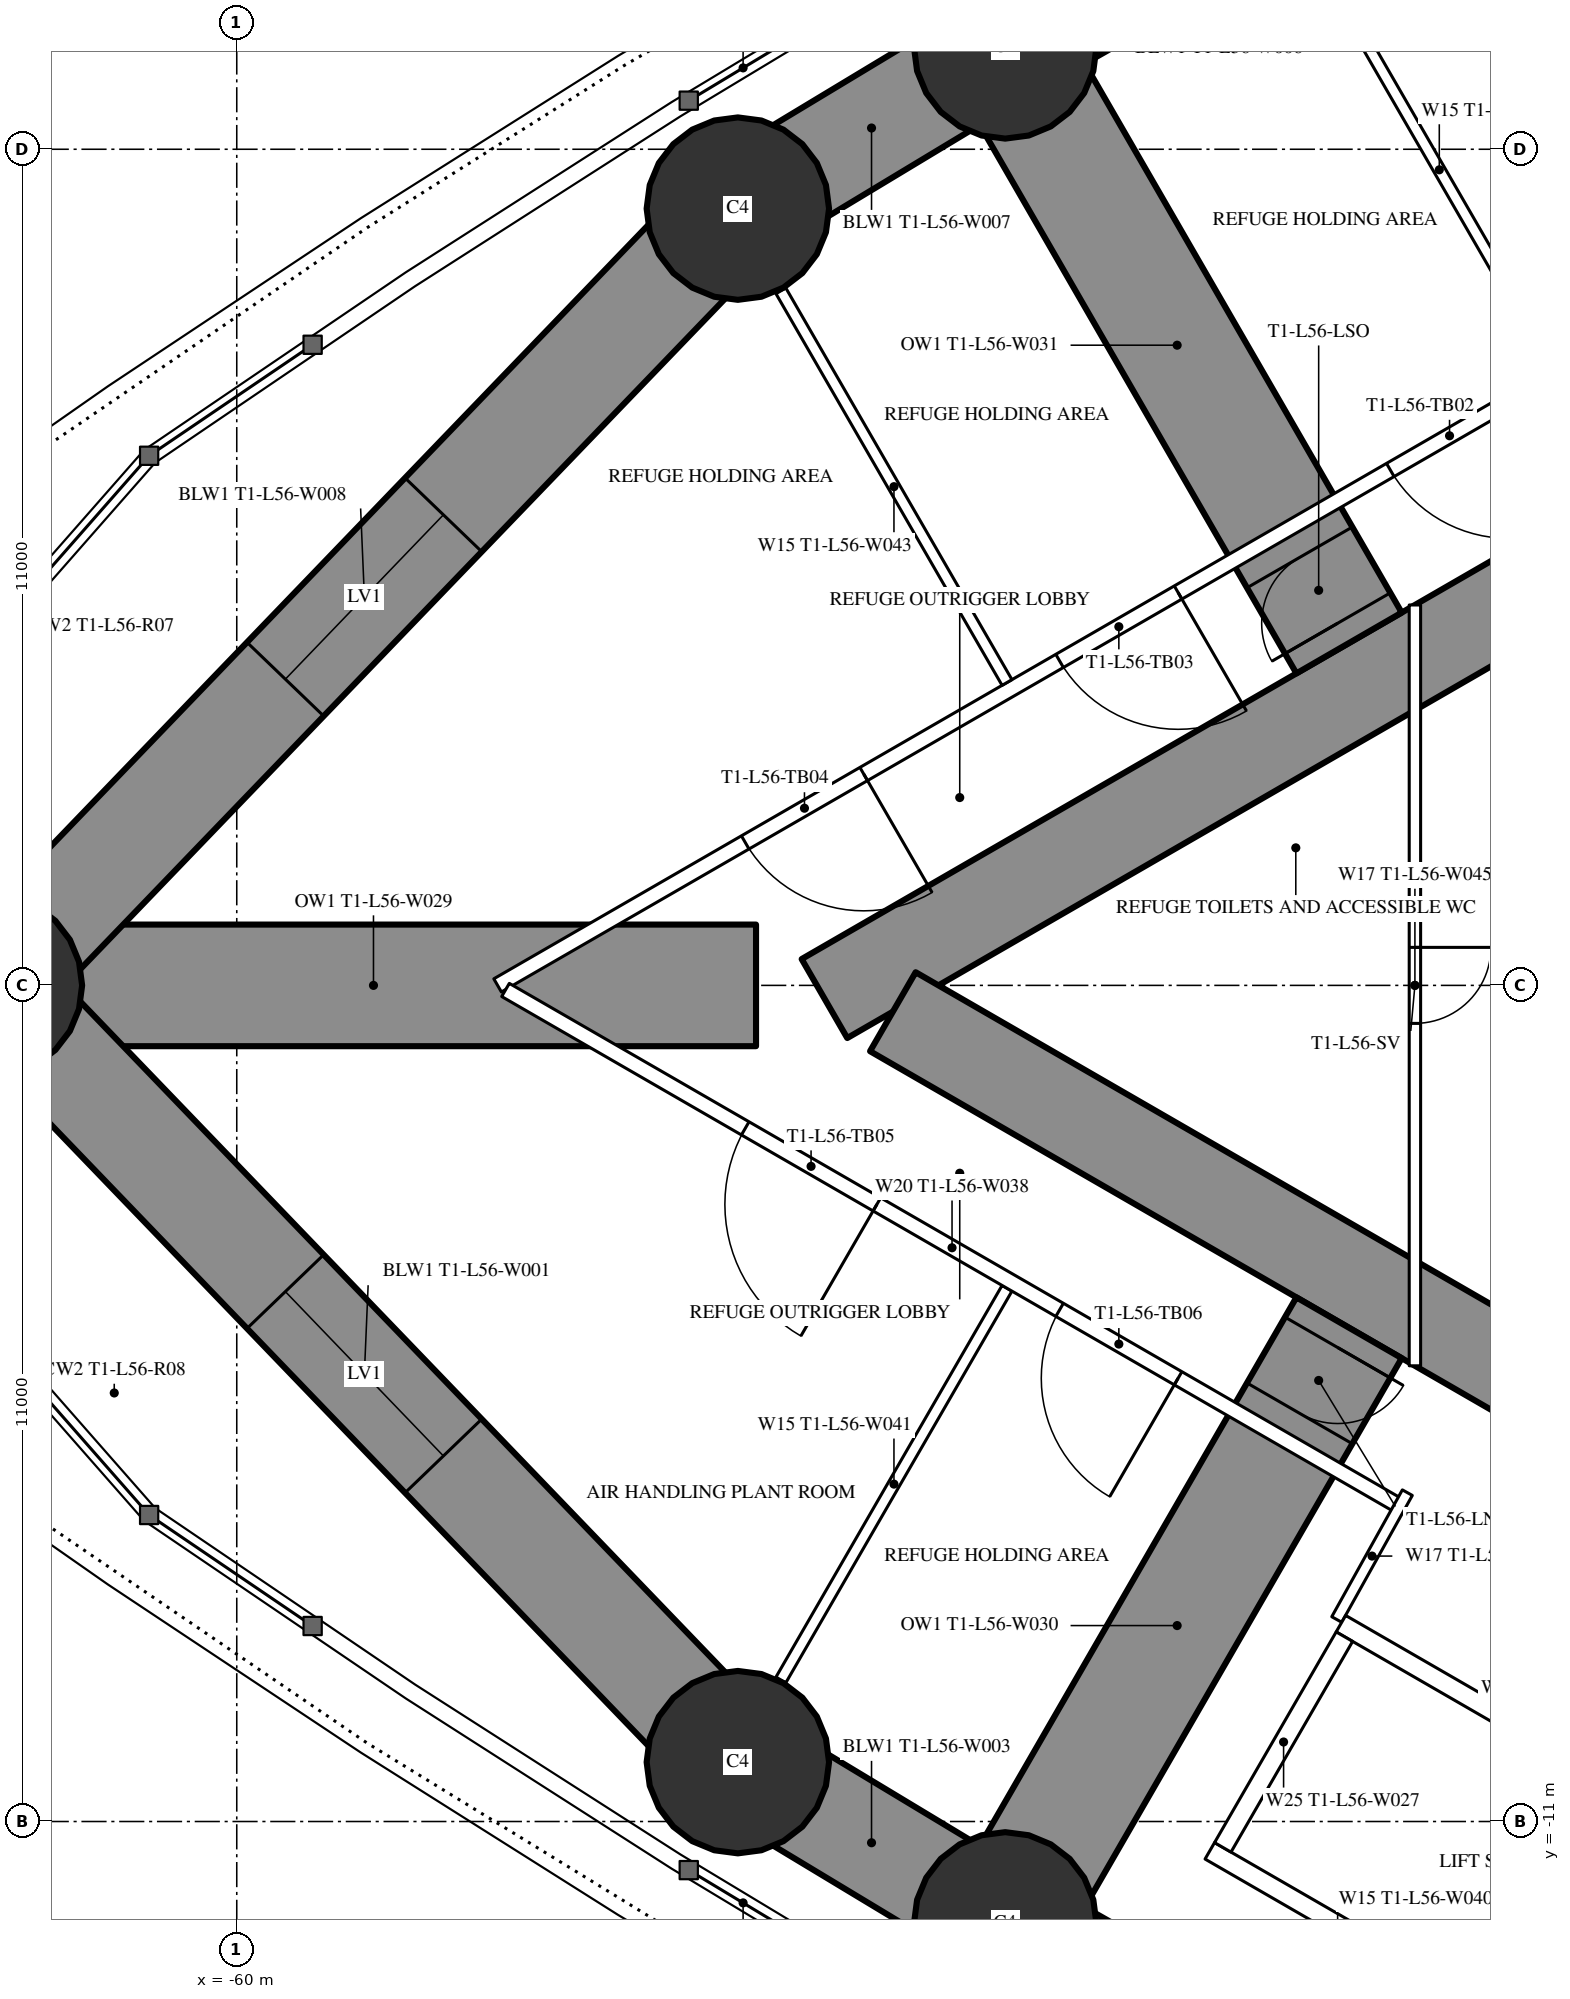
"""IFC4 building model, lengths in metres.
Left out: names, types, materials, properties, quantities, classifications, styles, units other than length and angle.
Written with IfcOpenShell. Run it as: python <this file> out.ifc"""

import sys

from ifc_helpers import new_model, si_unit, direction, frame, frame_2d, origin, origin_2d, place, context, subcontext, project, spatial, rectangle, circle, extrude, element, fill, save


model = new_model("IFC4")
c1 = context("Model", 3, precision=1e-05, world=origin(), true_north=direction((0.0, 1.0)))
c2 = subcontext(c1, "Body", "Model", "MODEL_VIEW")
j1 = project(units=[si_unit("LENGTHUNIT", "METRE"), si_unit("PLANEANGLEUNIT", "RADIAN")], contexts=[c1])
p1 = place(None, origin())
s1 = spatial("IfcSite", under=j1, at=p1, CompositionType="ELEMENT")
p2 = place(p1, origin())
s2 = spatial("IfcBuilding", under=s1, at=p2, CompositionType="ELEMENT")
p3 = place(p2, frame((0.0, 0.0, 210.3)))
s3 = spatial("IfcBuildingStorey", under=s2, at=p3, CompositionType="ELEMENT", Elevation=210.3)
for number, where, z_axis, x_axis in (
    (1, (-63.234, 0.0, 0.0), (0.0, 0.0, 1.0), (1.0, 0.0, 0.0)),
    (2, (-53.408, -10.219, 0.0), (0.0, 0.0, 1.0), (1.0, 0.0, 0.0)),
    (3, (-49.89, -12.34, 0.0), (0.0, 0.0, 1.0), (1.0, 0.0, 0.0)),
    (4, (-49.89, 12.34, 0.0), (0.0, 0.0, 1.0), (1.0, 0.0, 0.0)),
    (5, (-53.408, 10.219, 0.0), (0.0, 0.0, 1.0), (1.0, 0.0, 0.0)),
):
    element("IfcColumn", number, at=place(p3, frame(where, z_axis=z_axis, x_axis=x_axis)), inside=s3, PredefinedType="COLUMN", context=c2, shape_type="SweptSolid", body=[
        extrude(circle(Radius=1.2, at=origin_2d()), origin(), (0.0, 0.0, 1.0), 5.0),
    ])
p4 = place(p3, frame((-27.2, 14.3, 0.0), z_axis=(0.0, 0.0, 1.0), x_axis=(-0.866026593062, -0.499997940104, 0.0)))
e6 = element("IfcWall", 6, at=p4, inside=s3, PredefinedType="SHEAR", context=c2, shape_type="SweptSolid", body=[
    extrude(rectangle(XDim=28.946, YDim=1.2, at=frame_2d((14.473, 0.0))), origin(), (0.0, 0.0, 1.0), 5.0),
])
p5 = place(p4, frame((6.5, 0.0, 0.0)))
e7 = element("IfcOpeningElement", 7, at=p5, cuts=e6, PredefinedType="OPENING", context=c2, shape_type="SweptSolid", body=[
    extrude(rectangle(XDim=1.0, YDim=2.2, at=frame_2d((0.5, 1.1))), frame((0.0, 0.61, 0.0), z_axis=(0.0, -1.0, 0.0), x_axis=(1.0, 0.0, 0.0)), (0.0, 0.0, 1.0), 1.22),
])
p6 = place(p4, frame((13.568, 0.0, 0.0)))
e8 = element("IfcOpeningElement", 8, at=p6, cuts=e6, PredefinedType="OPENING", context=c2, shape_type="SweptSolid", body=[
    extrude(rectangle(XDim=1.8, YDim=2.2, at=frame_2d((0.9, 1.1))), frame((0.0, 0.61, 0.0), z_axis=(0.0, -1.0, 0.0), x_axis=(1.0, 0.0, 0.0)), (0.0, 0.0, 1.0), 1.22),
])
p7 = place(p3, frame((-27.2, -14.3, 0.0), z_axis=(0.0, 0.0, 1.0), x_axis=(-0.866024021859, 0.500002393557, 0.0)))
e9 = element("IfcWall", 9, at=p7, inside=s3, PredefinedType="SHEAR", context=c2, shape_type="SweptSolid", body=[
    extrude(rectangle(XDim=27.907, YDim=1.2, at=frame_2d((13.954, 0.0))), origin(), (0.0, 0.0, 1.0), 5.0),
])
p8 = place(p7, frame((6.5, 0.0, 0.0)))
e10 = element("IfcOpeningElement", 10, at=p8, cuts=e9, PredefinedType="OPENING", context=c2, shape_type="SweptSolid", body=[
    extrude(rectangle(XDim=1.0, YDim=2.2, at=frame_2d((0.5, 1.1))), frame((0.0, 0.61, 0.0), z_axis=(0.0, -1.0, 0.0), x_axis=(1.0, 0.0, 0.0)), (0.0, 0.0, 1.0), 1.22),
])
p9 = place(p7, frame((13.568, 0.0, 0.0)))
e11 = element("IfcOpeningElement", 11, at=p9, cuts=e9, PredefinedType="OPENING", context=c2, shape_type="SweptSolid", body=[
    extrude(rectangle(XDim=1.8, YDim=2.2, at=frame_2d((0.9, 1.1))), frame((0.0, 0.61, 0.0), z_axis=(0.0, -1.0, 0.0), x_axis=(1.0, 0.0, 0.0)), (0.0, 0.0, 1.0), 1.22),
])
p10 = place(p3, frame((-45.366, 4.504, 0.0), z_axis=(0.0, 0.0, 1.0), x_axis=(-0.499998848701, 0.866026068486, 0.0)))
e12 = element("IfcWall", 12, at=p10, inside=s3, PredefinedType="SHEAR", context=c2, shape_type="SweptSolid", body=[
    extrude(rectangle(XDim=9.048, YDim=1.6, at=frame_2d((4.524, 0.0))), origin(), (0.0, 0.0, 1.0), 5.0),
])
p11 = place(p10, frame((0.3, 0.0, 0.0)))
e13 = element("IfcOpeningElement", 13, at=p11, cuts=e12, PredefinedType="OPENING", context=c2, shape_type="SweptSolid", body=[
    extrude(rectangle(XDim=1.0, YDim=2.2, at=frame_2d((0.5, 1.1))), frame((0.0, 0.81, 0.0), z_axis=(0.0, -1.0, 0.0), x_axis=(1.0, 0.0, 0.0)), (0.0, 0.0, 1.0), 1.62),
])
p12 = place(p3, frame((-53.168, 0.0, 0.0), z_axis=(0.0, 0.0, 1.0), x_axis=(-1.0, 0.0, 0.0)))
e14 = element("IfcWall", 14, at=p12, inside=s3, PredefinedType="SHEAR", context=c2, shape_type="SweptSolid", body=[
    extrude(rectangle(XDim=10.066, YDim=1.6, at=frame_2d((5.033, 0.0))), origin(), (0.0, 0.0, 1.0), 5.0),
])
p13 = place(p3, frame((-45.366, -4.504, 0.0), z_axis=(0.0, 0.0, 1.0), x_axis=(-0.499998848701, -0.866026068486, 0.0)))
e15 = element("IfcWall", 15, at=p13, inside=s3, PredefinedType="SHEAR", context=c2, shape_type="SweptSolid", body=[
    extrude(rectangle(XDim=9.048, YDim=1.6, at=frame_2d((4.524, 0.0))), origin(), (0.0, 0.0, 1.0), 5.0),
])
p14 = place(p13, frame((0.3, 0.0, 0.0)))
e16 = element("IfcOpeningElement", 16, at=p14, cuts=e15, PredefinedType="OPENING", context=c2, shape_type="SweptSolid", body=[
    extrude(rectangle(XDim=1.0, YDim=2.2, at=frame_2d((0.5, 1.1))), frame((0.0, 0.81, 0.0), z_axis=(0.0, -1.0, 0.0), x_axis=(1.0, 0.0, 0.0)), (0.0, 0.0, 1.0), 1.62),
])
for number, where, z_axis, x_axis in (
    (17, (-46.317, 14.365, 0.0), (0.0, 0.0, 1.0), (-0.87, -0.493, 0.0)),
    (18, (-49.89, 12.34, 0.0), (0.0, 0.0, 1.0), (-0.856, -0.516, 0.0)),
):
    element("IfcWall", number, at=place(p3, frame(where, z_axis=z_axis, x_axis=x_axis)), inside=s3, PredefinedType="SHEAR", context=c2, shape_type="SweptSolid", body=[
        extrude(rectangle(XDim=4.108, YDim=1.4, at=frame_2d((2.054, 0.0))), origin(), (0.0, 0.0, 1.0), 5.0),
    ])
p15 = place(p3, frame((-53.408, 10.219, 0.0), z_axis=(0.0, 0.0, 1.0), x_axis=(-0.693134527053, -0.720808245934, 0.0)))
e19 = element("IfcWall", 19, at=p15, inside=s3, PredefinedType="SHEAR", context=c2, shape_type="SweptSolid", body=[
    extrude(rectangle(XDim=14.177, YDim=1.4, at=frame_2d((7.089, 0.0))), origin(), (0.0, 0.0, 1.0), 5.0),
])
p16 = place(p15, frame((5.589, 0.0, 0.6)))
e20 = element("IfcOpeningElement", 20, at=p16, cuts=e19, PredefinedType="OPENING", context=c2, shape_type="SweptSolid", body=[
    extrude(rectangle(XDim=3.0, YDim=1.2, at=frame_2d((1.5, 0.6))), frame((0.0, 0.71, 0.0), z_axis=(0.0, -1.0, 0.0), x_axis=(1.0, 0.0, 0.0)), (0.0, 0.0, 1.0), 1.42),
])
p17 = place(p3, frame((-63.234, 0.0, 0.0), z_axis=(0.0, 0.0, 1.0), x_axis=(0.693134527053, -0.720808245934, 0.0)))
e21 = element("IfcWall", 21, at=p17, inside=s3, PredefinedType="SHEAR", context=c2, shape_type="SweptSolid", body=[
    extrude(rectangle(XDim=14.177, YDim=1.4, at=frame_2d((7.089, 0.0))), origin(), (0.0, 0.0, 1.0), 5.0),
])
p18 = place(p17, frame((5.589, 0.0, 0.6)))
e22 = element("IfcOpeningElement", 22, at=p18, cuts=e21, PredefinedType="OPENING", context=c2, shape_type="SweptSolid", body=[
    extrude(rectangle(XDim=3.0, YDim=1.2, at=frame_2d((1.5, 0.6))), frame((0.0, 0.71, 0.0), z_axis=(0.0, -1.0, 0.0), x_axis=(1.0, 0.0, 0.0)), (0.0, 0.0, 1.0), 1.42),
])
for number, where, z_axis, x_axis in (
    (23, (-53.408, -10.219, 0.0), (0.0, 0.0, 1.0), (0.856, -0.516, 0.0)),
    (24, (-49.89, -12.34, 0.0), (0.0, 0.0, 1.0), (0.87, -0.493, 0.0)),
):
    element("IfcWall", number, at=place(p3, frame(where, z_axis=z_axis, x_axis=x_axis)), inside=s3, PredefinedType="SHEAR", context=c2, shape_type="SweptSolid", body=[
        extrude(rectangle(XDim=4.108, YDim=1.4, at=frame_2d((2.054, 0.0))), origin(), (0.0, 0.0, 1.0), 5.0),
    ])
p19 = place(p3, frame((-28.737, 16.068, 0.0), z_axis=(0.0, 0.0, 1.0), x_axis=(-0.866026057212, -0.499998868229, 0.0)))
e25 = element("IfcWall", 25, at=p19, inside=s3, PredefinedType="PARTITIONING", context=c2, shape_type="SweptSolid", body=[
    extrude(rectangle(XDim=32.137, YDim=0.2, at=frame_2d((16.068, 0.0))), origin(), (0.0, 0.0, 1.0), 4.75),
])
p20 = place(p19, frame((7.134, 0.0, 0.0)))
e26 = element("IfcOpeningElement", 26, at=p20, cuts=e25, PredefinedType="OPENING", context=c2, shape_type="SweptSolid", body=[
    extrude(rectangle(XDim=2.0, YDim=2.4, at=frame_2d((1.0, 1.2))), frame((0.0, 0.11, 0.0), z_axis=(0.0, -1.0, 0.0), x_axis=(1.0, 0.0, 0.0)), (0.0, 0.0, 1.0), 0.22),
])
p21 = place(p19, frame((16.776, 0.0, 0.0)))
e27 = element("IfcOpeningElement", 27, at=p21, cuts=e25, PredefinedType="OPENING", context=c2, shape_type="SweptSolid", body=[
    extrude(rectangle(XDim=1.8, YDim=2.2, at=frame_2d((0.9, 1.1))), frame((0.0, 0.11, 0.0), z_axis=(0.0, -1.0, 0.0), x_axis=(1.0, 0.0, 0.0)), (0.0, 0.0, 1.0), 0.22),
])
p22 = place(p19, frame((21.799, 0.0, 0.0)))
e28 = element("IfcOpeningElement", 28, at=p22, cuts=e25, PredefinedType="OPENING", context=c2, shape_type="SweptSolid", body=[
    extrude(rectangle(XDim=1.8, YDim=2.2, at=frame_2d((0.9, 1.1))), frame((0.0, 0.11, 0.0), z_axis=(0.0, -1.0, 0.0), x_axis=(1.0, 0.0, 0.0)), (0.0, 0.0, 1.0), 0.22),
])
p23 = place(p19, frame((26.575, 0.0, 0.0)))
e29 = element("IfcOpeningElement", 29, at=p23, cuts=e25, PredefinedType="OPENING", context=c2, shape_type="SweptSolid", body=[
    extrude(rectangle(XDim=1.8, YDim=2.2, at=frame_2d((0.9, 1.1))), frame((0.0, 0.11, 0.0), z_axis=(0.0, -1.0, 0.0), x_axis=(1.0, 0.0, 0.0)), (0.0, 0.0, 1.0), 0.22),
])
p24 = place(p3, frame((-42.68, 8.134, 0.0), z_axis=(0.0, 0.0, 1.0), x_axis=(-0.499984479505, 0.866034364361, 0.0)))
e30 = element("IfcWall", 30, at=p24, inside=s3, PredefinedType="PARTITIONING", context=c2, shape_type="SweptSolid", body=[
    extrude(rectangle(XDim=5.995, YDim=0.15, at=frame_2d((2.998, 0.0))), origin(), (0.0, 0.0, 1.0), 3.85),
])
for number, where, z_axis, x_axis in (
    (31, (-49.866, 3.985, 0.0), (0.0, 0.0, 1.0), (-0.5, 0.866, 0.0)),
    (32, (-49.866, -3.985, 0.0), (0.0, 0.0, 1.0), (-0.5, -0.866, 0.0)),
):
    element("IfcWall", number, at=place(p3, frame(where, z_axis=z_axis, x_axis=x_axis)), inside=s3, PredefinedType="PARTITIONING", context=c2, shape_type="SweptSolid", body=[
        extrude(rectangle(XDim=5.95, YDim=0.15, at=frame_2d((2.975, 0.0))), origin(), (0.0, 0.0, 1.0), 3.85),
    ])
p25 = place(p3, frame((-44.715, -6.844, 0.0), z_axis=(0.0, 0.0, 1.0), x_axis=(-0.866025261224, 0.500000246922, 0.0)))
e33 = element("IfcWall", 33, at=p25, inside=s3, PredefinedType="PARTITIONING", context=c2, shape_type="SweptSolid", body=[
    extrude(rectangle(XDim=13.567, YDim=0.2, at=frame_2d((6.783, 0.0))), origin(), (0.0, 0.0, 1.0), 4.75),
])
p26 = place(p25, frame((7.925, 0.0, 0.0)))
e34 = element("IfcOpeningElement", 34, at=p26, cuts=e33, PredefinedType="OPENING", context=c2, shape_type="SweptSolid", body=[
    extrude(rectangle(XDim=2.0, YDim=2.4, at=frame_2d((1.0, 1.2))), frame((0.0, 0.11, 0.0), z_axis=(0.0, -1.0, 0.0), x_axis=(1.0, 0.0, 0.0)), (0.0, 0.0, 1.0), 0.22),
])
p27 = place(p25, frame((3.349, 0.0, 0.0)))
e35 = element("IfcOpeningElement", 35, at=p27, cuts=e33, PredefinedType="OPENING", context=c2, shape_type="SweptSolid", body=[
    extrude(rectangle(XDim=1.8, YDim=2.2, at=frame_2d((0.9, 1.1))), frame((0.0, 0.11, 0.0), z_axis=(0.0, -1.0, 0.0), x_axis=(1.0, 0.0, 0.0)), (0.0, 0.0, 1.0), 0.22),
])
p28 = place(p3, frame((-44.6, -6.673, 0.0), z_axis=(0.0, 0.0, 1.0), x_axis=(-0.486293872994, -0.873795324483, 0.0)))
e36 = element("IfcWall", 36, at=p28, inside=s3, PredefinedType="PARTITIONING", context=c2, shape_type="SweptSolid", body=[
    extrude(rectangle(XDim=1.91, YDim=0.15, at=frame_2d((0.955, 0.0))), origin(), (0.0, 0.0, 1.0), 4.75),
])
p29 = place(p3, frame((-44.5, 5.005, 0.0), z_axis=(0.0, 0.0, 1.0), x_axis=(0.0, -1.0, 0.0)))
e37 = element("IfcWall", 37, at=p29, inside=s3, PredefinedType="PARTITIONING", context=c2, shape_type="SweptSolid", body=[
    extrude(rectangle(XDim=10.009, YDim=0.15, at=frame_2d((5.005, 0.0))), origin(), (0.0, 0.0, 1.0), 4.75),
])
p30 = place(p29, frame((4.505, 0.0, 0.0)))
e38 = element("IfcOpeningElement", 38, at=p30, cuts=e37, PredefinedType="OPENING", context=c2, shape_type="SweptSolid", body=[
    extrude(rectangle(XDim=1.0, YDim=2.2, at=frame_2d((0.5, 1.1))), frame((0.0, 0.085, 0.0), z_axis=(0.0, -1.0, 0.0), x_axis=(1.0, 0.0, 0.0)), (0.0, 0.0, 1.0), 0.17),
])
p31 = place(p3, frame((-39.758, -11.697, 0.0), z_axis=(0.0, 0.0, 1.0), x_axis=(-0.866024194504, 0.500002094529, 0.0)))
e39 = element("IfcWall", 39, at=p31, inside=s3, PredefinedType="PARTITIONING", context=c2, shape_type="SweptSolid", body=[
    extrude(rectangle(XDim=6.6, YDim=0.25, at=frame_2d((3.3, 0.0))), origin(), (0.0, 0.0, 1.0), 4.75),
])
p32 = place(p3, frame((-41.482, -14.686, 0.0), z_axis=(0.0, 0.0, 1.0), x_axis=(-0.86603344179, 0.499986077507, 0.0)))
e40 = element("IfcWall", 40, at=p32, inside=s3, PredefinedType="PARTITIONING", context=c2, shape_type="SweptSolid", body=[
    extrude(rectangle(XDim=6.6, YDim=0.25, at=frame_2d((3.3, 0.0))), origin(), (0.0, 0.0, 1.0), 4.75),
])
p33 = place(p3, frame((-45.428, -8.568, 0.0), z_axis=(0.0, 0.0, 1.0), x_axis=(-0.499929347863, -0.866066190972, 0.0)))
e41 = element("IfcWall", 41, at=p33, inside=s3, PredefinedType="PARTITIONING", context=c2, shape_type="SweptSolid", body=[
    extrude(rectangle(XDim=3.201, YDim=0.25, at=frame_2d((1.6, 0.0))), origin(), (0.0, 0.0, 1.0), 4.75),
])
p34 = place(p16, origin())
e42 = element("IfcWindow", 42, at=p34, inside=s3, PartitioningType="SINGLE_PANEL", PredefinedType="WINDOW", context=c2, shape_type="SweptSolid", body=[
    extrude(rectangle(XDim=3.0, YDim=1.2, at=frame_2d((1.5, 0.6))), frame((0.0, 0.03, 0.0), z_axis=(0.0, -1.0, 0.0), x_axis=(1.0, 0.0, 0.0)), (0.0, 0.0, 1.0), 0.06),
])
fill(e20, e42)
p35 = place(p18, origin())
e43 = element("IfcWindow", 43, at=p35, inside=s3, PartitioningType="SINGLE_PANEL", PredefinedType="WINDOW", context=c2, shape_type="SweptSolid", body=[
    extrude(rectangle(XDim=3.0, YDim=1.2, at=frame_2d((1.5, 0.6))), frame((0.0, 0.03, 0.0), z_axis=(0.0, -1.0, 0.0), x_axis=(1.0, 0.0, 0.0)), (0.0, 0.0, 1.0), 0.06),
])
fill(e22, e43)
p36 = place(p11, origin())
e44 = element("IfcDoor", 44, at=p36, inside=s3, OperationType="SINGLE_SWING_LEFT", PredefinedType="DOOR", context=c2, shape_type="SweptSolid", body=[
    extrude(rectangle(XDim=1.0, YDim=2.2, at=frame_2d((0.5, 1.1))), frame((0.0, 0.025, 0.0), z_axis=(0.0, -1.0, 0.0), x_axis=(1.0, 0.0, 0.0)), (0.0, 0.0, 1.0), 0.05),
])
fill(e13, e44)
p37 = place(p14, origin())
e45 = element("IfcDoor", 45, at=p37, inside=s3, OperationType="SINGLE_SWING_LEFT", PredefinedType="DOOR", context=c2, shape_type="SweptSolid", body=[
    extrude(rectangle(XDim=1.0, YDim=2.2, at=frame_2d((0.5, 1.1))), frame((0.0, 0.025, 0.0), z_axis=(0.0, -1.0, 0.0), x_axis=(1.0, 0.0, 0.0)), (0.0, 0.0, 1.0), 0.05),
])
fill(e16, e45)
p38 = place(p21, origin())
e46 = element("IfcDoor", 46, at=p38, inside=s3, OperationType="DOUBLE_DOOR_SINGLE_SWING", PredefinedType="DOOR", context=c2, shape_type="SweptSolid", body=[
    extrude(rectangle(XDim=1.8, YDim=2.2, at=frame_2d((0.9, 1.1))), frame((0.0, 0.025, 0.0), z_axis=(0.0, -1.0, 0.0), x_axis=(1.0, 0.0, 0.0)), (0.0, 0.0, 1.0), 0.05),
])
fill(e27, e46)
p39 = place(p22, origin())
e47 = element("IfcDoor", 47, at=p39, inside=s3, OperationType="DOUBLE_DOOR_SINGLE_SWING", PredefinedType="DOOR", context=c2, shape_type="SweptSolid", body=[
    extrude(rectangle(XDim=1.8, YDim=2.2, at=frame_2d((0.9, 1.1))), frame((0.0, 0.025, 0.0), z_axis=(0.0, -1.0, 0.0), x_axis=(1.0, 0.0, 0.0)), (0.0, 0.0, 1.0), 0.05),
])
fill(e28, e47)
p40 = place(p23, origin())
e48 = element("IfcDoor", 48, at=p40, inside=s3, OperationType="DOUBLE_DOOR_SINGLE_SWING", PredefinedType="DOOR", context=c2, shape_type="SweptSolid", body=[
    extrude(rectangle(XDim=1.8, YDim=2.2, at=frame_2d((0.9, 1.1))), frame((0.0, 0.025, 0.0), z_axis=(0.0, -1.0, 0.0), x_axis=(1.0, 0.0, 0.0)), (0.0, 0.0, 1.0), 0.05),
])
fill(e29, e48)
p41 = place(p26, origin())
e49 = element("IfcDoor", 49, at=p41, inside=s3, OperationType="DOUBLE_DOOR_SINGLE_SWING", PredefinedType="DOOR", context=c2, shape_type="SweptSolid", body=[
    extrude(rectangle(XDim=2.0, YDim=2.4, at=frame_2d((1.0, 1.2))), frame((0.0, 0.025, 0.0), z_axis=(0.0, -1.0, 0.0), x_axis=(1.0, 0.0, 0.0)), (0.0, 0.0, 1.0), 0.05),
])
fill(e34, e49)
p42 = place(p27, origin())
e50 = element("IfcDoor", 50, at=p42, inside=s3, OperationType="DOUBLE_DOOR_SINGLE_SWING", PredefinedType="DOOR", context=c2, shape_type="SweptSolid", body=[
    extrude(rectangle(XDim=1.8, YDim=2.2, at=frame_2d((0.9, 1.1))), frame((0.0, 0.025, 0.0), z_axis=(0.0, -1.0, 0.0), x_axis=(1.0, 0.0, 0.0)), (0.0, 0.0, 1.0), 0.05),
])
fill(e35, e50)
p43 = place(p30, origin())
e51 = element("IfcDoor", 51, at=p43, inside=s3, OperationType="SINGLE_SWING_LEFT", PredefinedType="DOOR", context=c2, shape_type="SweptSolid", body=[
    extrude(rectangle(XDim=1.0, YDim=2.2, at=frame_2d((0.5, 1.1))), frame((0.0, 0.025, 0.0), z_axis=(0.0, -1.0, 0.0), x_axis=(1.0, 0.0, 0.0)), (0.0, 0.0, 1.0), 0.05),
])
fill(e38, e51)
save(model, sys.argv[1])
